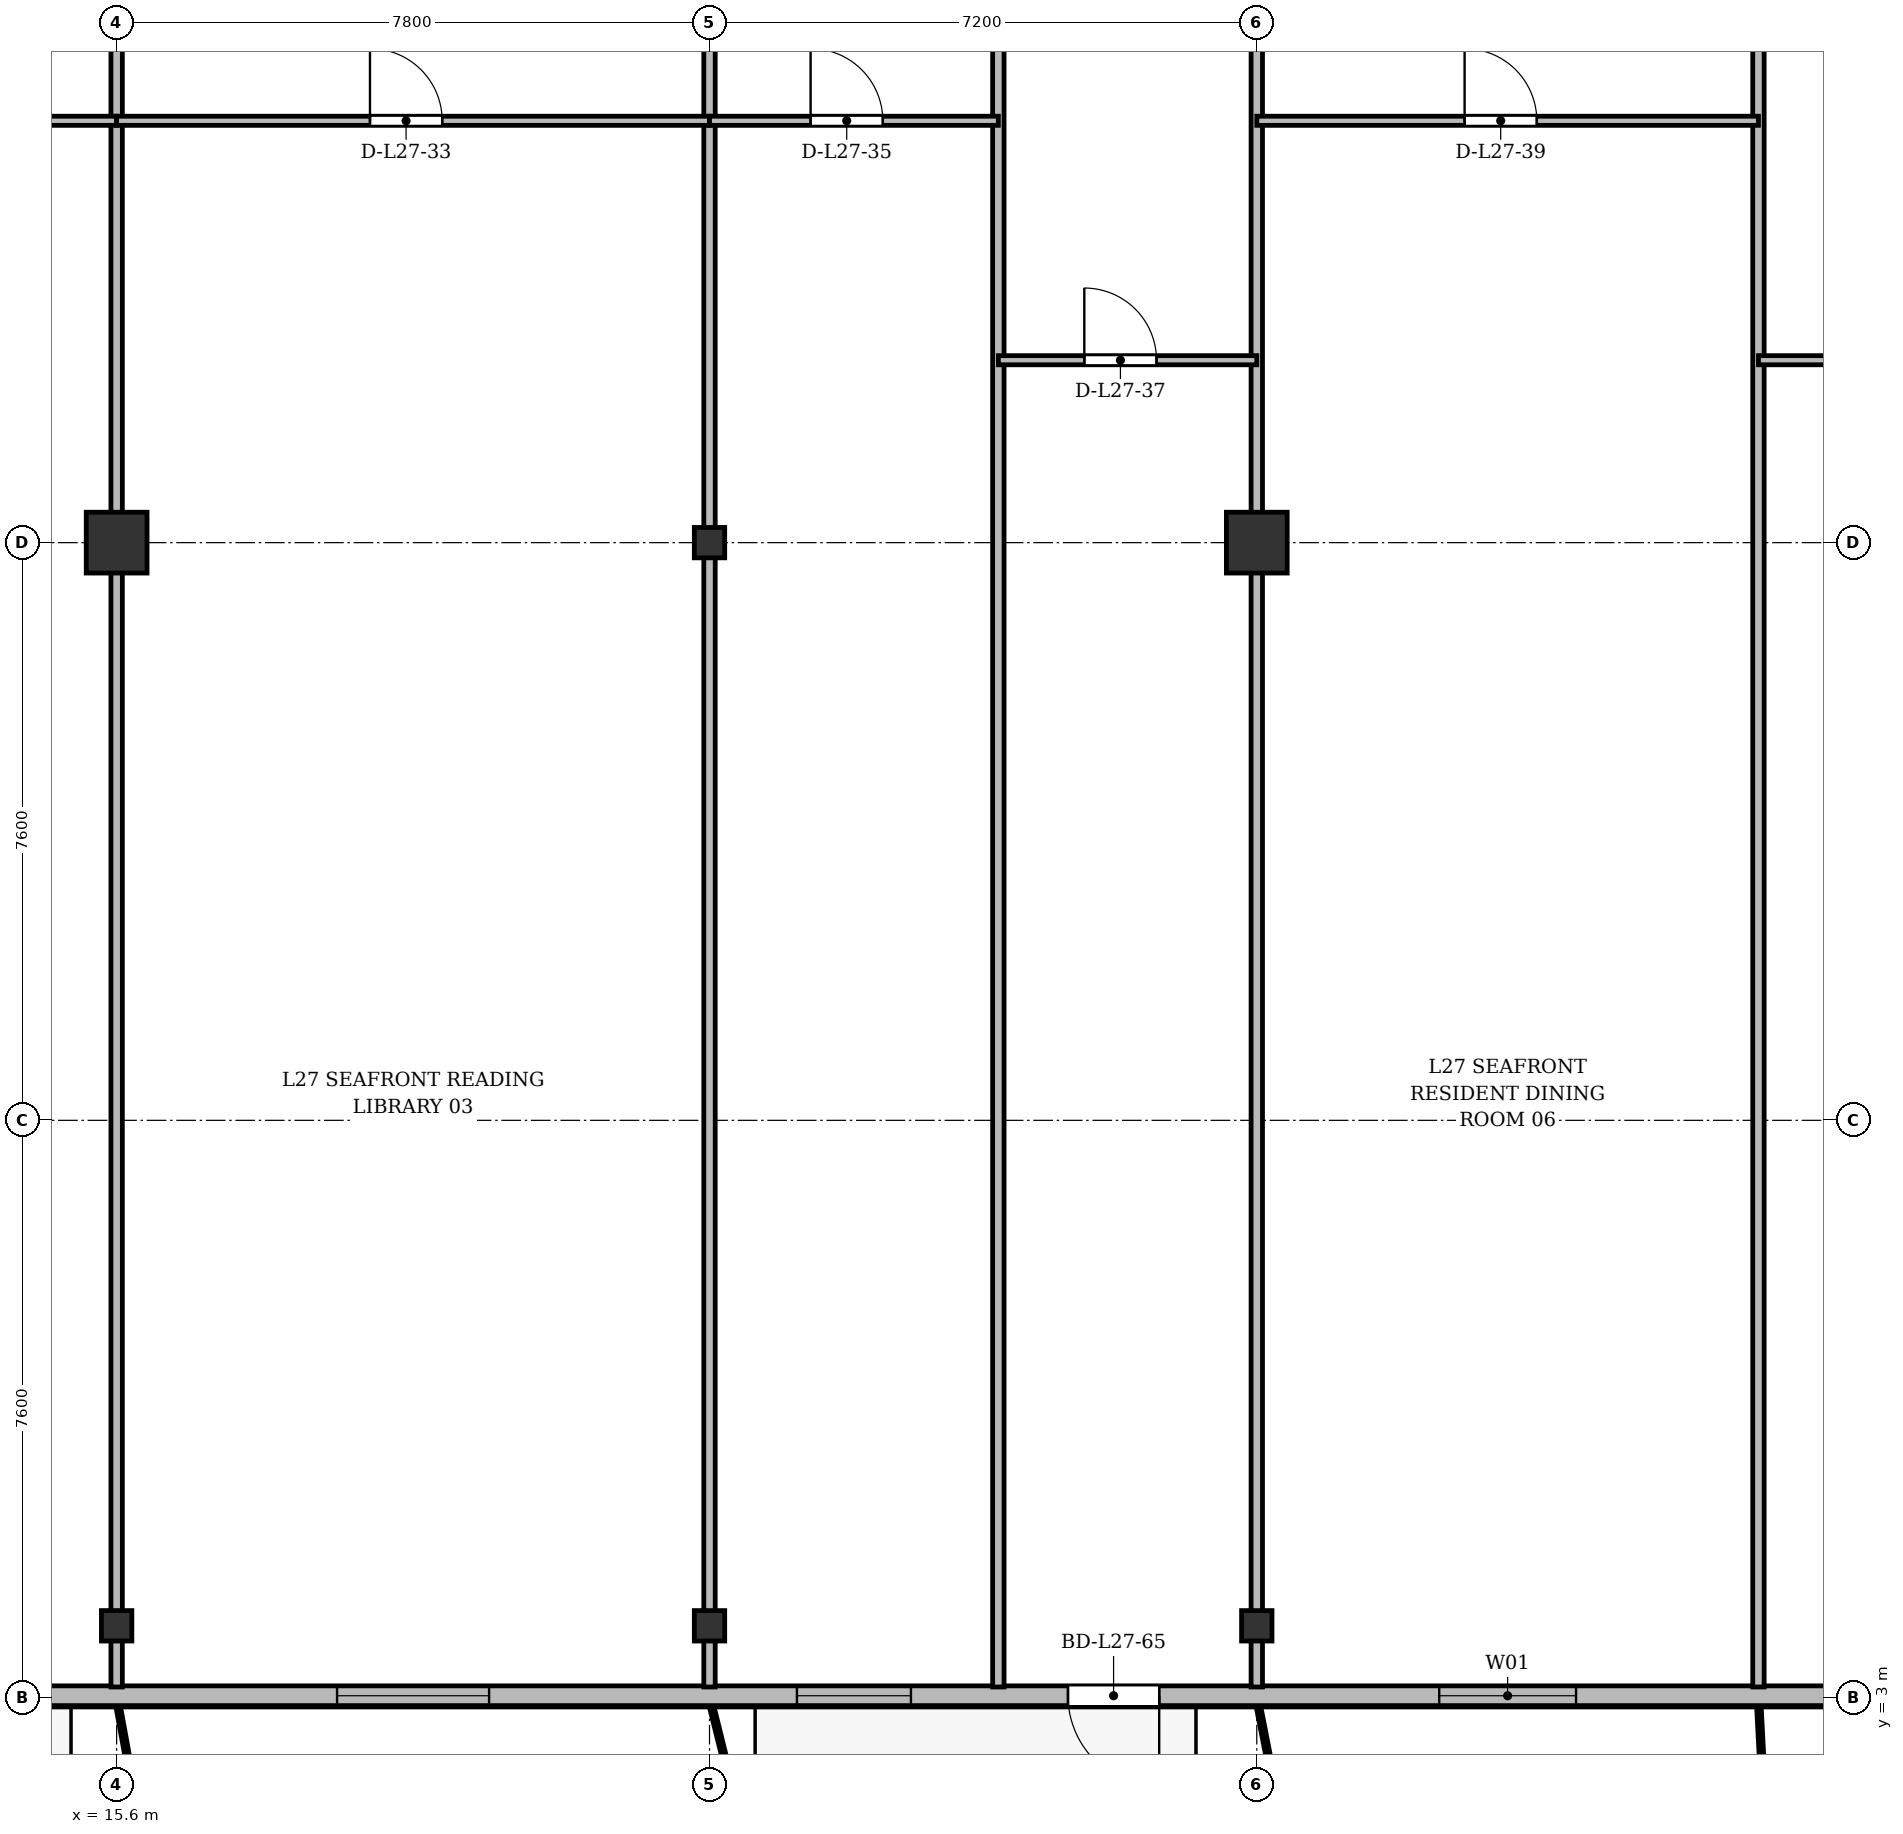
"""IFC4 building model, lengths in metres.
Left out: names, types, materials, properties, quantities, classifications, styles, units other than length and angle.
Written with IfcOpenShell. Run it as: python <this file> out.ifc"""

import sys

from ifc_helpers import new_model, si_unit, direction, frame, frame_2d, origin, origin_2d, place, context, subcontext, project, spatial, rectangle, i_section, extrude, source, transform, mapped, element, fill, save


model = new_model("IFC4")
c1 = context("Model", 3, precision=1e-05, world=origin(), true_north=direction((0.0, 1.0)))
c2 = subcontext(c1, "Body", "Model", "MODEL_VIEW")
j1 = project(units=[si_unit("LENGTHUNIT", "METRE"), si_unit("PLANEANGLEUNIT", "RADIAN")], contexts=[c1])
p1 = place(None, origin())
s1 = spatial("IfcSite", under=j1, at=p1, CompositionType="ELEMENT")
p2 = place(p1, origin())
s2 = spatial("IfcBuilding", under=s1, at=p2, CompositionType="ELEMENT")
p3 = place(p2, frame((0.0, 0.0, 106.9)))
s3 = spatial("IfcBuildingStorey", under=s2, at=p3, CompositionType="ELEMENT", Elevation=106.9)
m1 = source(origin(), c2, "Body", "SweptSolid", [
    extrude(i_section(OverallWidth=0.4, OverallDepth=0.4, WebThickness=0.022, FlangeThickness=0.035, at=origin_2d()), origin(), (0.0, 0.0, 1.0), 3.6),
])
p4 = place(p3, frame((15.6, 3.95, 0.0), z_axis=(0.0, 0.0, 1.0), x_axis=(1.0, 0.0, 0.0)))
e1 = element("IfcColumn", 1, at=p4, inside=s3, PredefinedType="COLUMN", context=c2, shape_type="MappedRepresentation", body=[
    mapped(m1, transform((0.0, 0.0, 0.0), x_axis=(1.0, 0.0, 0.0), y_axis=(0.0, 1.0, 0.0), z_axis=(0.0, 0.0, 1.0), scale=1.0)),
])
m2 = source(origin(), c2, "Body", "SweptSolid", [
    extrude(rectangle(XDim=0.8, YDim=0.8, at=origin_2d()), origin(), (0.0, 0.0, 1.0), 3.6),
])
p5 = place(p3, frame((15.6, 18.2, 0.0), z_axis=(0.0, 0.0, 1.0), x_axis=(1.0, 0.0, 0.0)))
e2 = element("IfcColumn", 2, at=p5, inside=s3, PredefinedType="COLUMN", context=c2, shape_type="MappedRepresentation", body=[
    mapped(m2, transform((0.0, 0.0, 0.0), x_axis=(1.0, 0.0, 0.0), y_axis=(0.0, 1.0, 0.0), z_axis=(0.0, 0.0, 1.0), scale=1.0)),
])
for number, where, z_axis, x_axis in (
    (3, (23.4, 3.95, 0.0), (0.0, 0.0, 1.0), (1.0, 0.0, 0.0)),
    (4, (23.4, 18.2, 0.0), (0.0, 0.0, 1.0), (1.0, 0.0, 0.0)),
    (5, (30.6, 3.95, 0.0), (0.0, 0.0, 1.0), (1.0, 0.0, 0.0)),
):
    element("IfcColumn", number, at=place(p3, frame(where, z_axis=z_axis, x_axis=x_axis)), inside=s3, PredefinedType="COLUMN", context=c2, shape_type="MappedRepresentation", body=[
        mapped(m1, transform((0.0, 0.0, 0.0), x_axis=(1.0, 0.0, 0.0), y_axis=(0.0, 1.0, 0.0), z_axis=(0.0, 0.0, 1.0), scale=1.0)),
    ])
p6 = place(p3, frame((30.6, 18.2, 0.0), z_axis=(0.0, 0.0, 1.0), x_axis=(1.0, 0.0, 0.0)))
e6 = element("IfcColumn", 6, at=p6, inside=s3, PredefinedType="COLUMN", context=c2, shape_type="MappedRepresentation", body=[
    mapped(m2, transform((0.0, 0.0, 0.0), x_axis=(1.0, 0.0, 0.0), y_axis=(0.0, 1.0, 0.0), z_axis=(0.0, 0.0, 1.0), scale=1.0)),
])
p7 = place(p3, frame((66.9, 3.03, 0.0), z_axis=(0.0, 0.0, 1.0), x_axis=(-1.0, 0.0, 0.0)))
e7 = element("IfcWall", 7, at=p7, inside=s3, PredefinedType="SOLIDWALL", context=c2, shape_type="SweptSolid", body=[
    extrude(rectangle(XDim=59.4, YDim=0.26, at=frame_2d((29.7, 0.0))), origin(), (0.0, 0.0, 1.0), 3.34),
])
p8 = place(p7, frame((2.0, 0.0, 0.9)))
e8 = element("IfcOpeningElement", 8, at=p8, cuts=e7, PredefinedType="OPENING", context=c2, shape_type="SweptSolid", body=[
    extrude(rectangle(XDim=2.0, YDim=1.95, at=frame_2d((1.0, 0.975))), frame((0.0, 0.14, 0.0), z_axis=(0.0, -1.0, 0.0), x_axis=(1.0, 0.0, 0.0)), (0.0, 0.0, 1.0), 0.28),
])
p9 = place(p7, frame((5.575, 0.0, 0.9)))
e9 = element("IfcOpeningElement", 9, at=p9, cuts=e7, PredefinedType="OPENING", context=c2, shape_type="SweptSolid", body=[
    extrude(rectangle(XDim=1.65, YDim=1.85, at=frame_2d((0.825, 0.925))), frame((0.0, 0.14, 0.0), z_axis=(0.0, -1.0, 0.0), x_axis=(1.0, 0.0, 0.0)), (0.0, 0.0, 1.0), 0.28),
])
p10 = place(p7, frame((9.213, 0.0, 0.0)))
e10 = element("IfcOpeningElement", 10, at=p10, cuts=e7, PredefinedType="OPENING", context=c2, shape_type="SweptSolid", body=[
    extrude(rectangle(XDim=1.2, YDim=2.2, at=frame_2d((0.6, 1.1))), frame((0.0, 0.14, 0.0), z_axis=(0.0, -1.0, 0.0), x_axis=(1.0, 0.0, 0.0)), (0.0, 0.0, 1.0), 0.28),
])
p11 = place(p7, frame((12.8, 0.0, 0.9)))
e11 = element("IfcOpeningElement", 11, at=p11, cuts=e7, PredefinedType="OPENING", context=c2, shape_type="SweptSolid", body=[
    extrude(rectangle(XDim=2.2, YDim=1.8, at=frame_2d((1.1, 0.9))), frame((0.0, 0.14, 0.0), z_axis=(0.0, -1.0, 0.0), x_axis=(1.0, 0.0, 0.0)), (0.0, 0.0, 1.0), 0.28),
])
p12 = place(p7, frame((16.95, 0.0, 0.9)))
e12 = element("IfcOpeningElement", 12, at=p12, cuts=e7, PredefinedType="OPENING", context=c2, shape_type="SweptSolid", body=[
    extrude(rectangle(XDim=1.5, YDim=1.75, at=frame_2d((0.75, 0.875))), frame((0.0, 0.14, 0.0), z_axis=(0.0, -1.0, 0.0), x_axis=(1.0, 0.0, 0.0)), (0.0, 0.0, 1.0), 0.28),
])
p13 = place(p7, frame((20.3, 0.0, 0.9)))
e13 = element("IfcOpeningElement", 13, at=p13, cuts=e7, PredefinedType="OPENING", context=c2, shape_type="SweptSolid", body=[
    extrude(rectangle(XDim=2.0, YDim=1.95, at=frame_2d((1.0, 0.975))), frame((0.0, 0.14, 0.0), z_axis=(0.0, -1.0, 0.0), x_axis=(1.0, 0.0, 0.0)), (0.0, 0.0, 1.0), 0.28),
])
p14 = place(p7, frame((25.575, 0.0, 0.9)))
e14 = element("IfcOpeningElement", 14, at=p14, cuts=e7, PredefinedType="OPENING", context=c2, shape_type="SweptSolid", body=[
    extrude(rectangle(XDim=1.65, YDim=1.85, at=frame_2d((0.825, 0.925))), frame((0.0, 0.14, 0.0), z_axis=(0.0, -1.0, 0.0), x_axis=(1.0, 0.0, 0.0)), (0.0, 0.0, 1.0), 0.28),
])
p15 = place(p7, frame((32.1, 0.0, 0.9)))
e15 = element("IfcOpeningElement", 15, at=p15, cuts=e7, PredefinedType="OPENING", context=c2, shape_type="SweptSolid", body=[
    extrude(rectangle(XDim=1.8, YDim=1.8, at=frame_2d((0.9, 0.9))), frame((0.0, 0.14, 0.0), z_axis=(0.0, -1.0, 0.0), x_axis=(1.0, 0.0, 0.0)), (0.0, 0.0, 1.0), 0.28),
])
p16 = place(p7, frame((37.584, 0.0, 0.0)))
e16 = element("IfcOpeningElement", 16, at=p16, cuts=e7, PredefinedType="OPENING", context=c2, shape_type="SweptSolid", body=[
    extrude(rectangle(XDim=1.2, YDim=2.2, at=frame_2d((0.6, 1.1))), frame((0.0, 0.14, 0.0), z_axis=(0.0, -1.0, 0.0), x_axis=(1.0, 0.0, 0.0)), (0.0, 0.0, 1.0), 0.28),
])
p17 = place(p7, frame((40.85, 0.0, 0.9)))
e17 = element("IfcOpeningElement", 17, at=p17, cuts=e7, PredefinedType="OPENING", context=c2, shape_type="SweptSolid", body=[
    extrude(rectangle(XDim=1.5, YDim=1.75, at=frame_2d((0.75, 0.875))), frame((0.0, 0.14, 0.0), z_axis=(0.0, -1.0, 0.0), x_axis=(1.0, 0.0, 0.0)), (0.0, 0.0, 1.0), 0.28),
])
p18 = place(p7, frame((46.4, 0.0, 0.9)))
e18 = element("IfcOpeningElement", 18, at=p18, cuts=e7, PredefinedType="OPENING", context=c2, shape_type="SweptSolid", body=[
    extrude(rectangle(XDim=2.0, YDim=1.95, at=frame_2d((1.0, 0.975))), frame((0.0, 0.14, 0.0), z_axis=(0.0, -1.0, 0.0), x_axis=(1.0, 0.0, 0.0)), (0.0, 0.0, 1.0), 0.28),
])
p19 = place(p7, frame((55.817, 0.0, 0.0)))
e19 = element("IfcOpeningElement", 19, at=p19, cuts=e7, PredefinedType="OPENING", context=c2, shape_type="SweptSolid", body=[
    extrude(rectangle(XDim=1.2, YDim=2.2, at=frame_2d((0.6, 1.1))), frame((0.0, 0.14, 0.0), z_axis=(0.0, -1.0, 0.0), x_axis=(1.0, 0.0, 0.0)), (0.0, 0.0, 1.0), 0.28),
])
for number, where, z_axis, x_axis in (
    (20, (15.6, 3.145, 0.0), (0.0, 0.0, 1.0), (0.0, 1.0, 0.0)),
    (21, (23.4, 3.145, 0.0), (0.0, 0.0, 1.0), (0.0, 1.0, 0.0)),
):
    element("IfcWall", number, at=place(p3, frame(where, z_axis=z_axis, x_axis=x_axis)), inside=s3, PredefinedType="PARTITIONING", context=c2, shape_type="SweptSolid", body=[
        extrude(rectangle(XDim=24.455, YDim=0.15, at=frame_2d((12.228, 0.0))), origin(), (0.0, 0.0, 1.0), 2.84),
    ])
p20 = place(p3, frame((27.2, 3.145, 0.0), z_axis=(0.0, 0.0, 1.0), x_axis=(0.0, 1.0, 0.0)))
e22 = element("IfcWall", 22, at=p20, inside=s3, PredefinedType="PARTITIONING", context=c2, shape_type="SweptSolid", body=[
    extrude(rectangle(XDim=24.455, YDim=0.15, at=frame_2d((12.228, 0.0))), origin(), (0.0, 0.0, 1.0), 2.752),
])
p21 = place(p3, frame((30.6, 3.145, 0.0), z_axis=(0.0, 0.0, 1.0), x_axis=(0.0, 1.0, 0.0)))
e23 = element("IfcWall", 23, at=p21, inside=s3, PredefinedType="PARTITIONING", context=c2, shape_type="SweptSolid", body=[
    extrude(rectangle(XDim=24.455, YDim=0.15, at=frame_2d((12.228, 0.0))), origin(), (0.0, 0.0, 1.0), 2.84),
])
p22 = place(p3, frame((37.2, 3.145, 0.0), z_axis=(0.0, 0.0, 1.0), x_axis=(0.0, 1.0, 0.0)))
e24 = element("IfcWall", 24, at=p22, inside=s3, PredefinedType="PARTITIONING", context=c2, shape_type="SweptSolid", body=[
    extrude(rectangle(XDim=24.455, YDim=0.15, at=frame_2d((12.228, 0.0))), origin(), (0.0, 0.0, 1.0), 2.752),
])
p23 = place(p3, frame((8.8, 23.75, 0.0), z_axis=(0.0, 0.0, 1.0), x_axis=(1.0, 0.0, 0.0)))
e25 = element("IfcWall", 25, at=p23, inside=s3, PredefinedType="PARTITIONING", context=c2, shape_type="SweptSolid", body=[
    extrude(rectangle(XDim=6.8, YDim=0.12, at=frame_2d((3.4, 0.0))), origin(), (0.0, 0.0, 1.0), 2.84),
])
p24 = place(p23, frame((2.925, 0.0, 0.0)))
e26 = element("IfcOpeningElement", 26, at=p24, cuts=e25, PredefinedType="OPENING", context=c2, shape_type="SweptSolid", body=[
    extrude(rectangle(XDim=0.95, YDim=2.15, at=frame_2d((0.475, 1.075))), frame((0.0, 0.07, 0.0), z_axis=(0.0, -1.0, 0.0), x_axis=(1.0, 0.0, 0.0)), (0.0, 0.0, 1.0), 0.14),
])
p25 = place(p3, frame((15.6, 23.75, 0.0), z_axis=(0.0, 0.0, 1.0), x_axis=(1.0, 0.0, 0.0)))
e27 = element("IfcWall", 27, at=p25, inside=s3, PredefinedType="PARTITIONING", context=c2, shape_type="SweptSolid", body=[
    extrude(rectangle(XDim=7.8, YDim=0.12, at=frame_2d((3.9, 0.0))), origin(), (0.0, 0.0, 1.0), 2.84),
])
p26 = place(p25, frame((3.333, 0.0, 0.0)))
e28 = element("IfcOpeningElement", 28, at=p26, cuts=e27, PredefinedType="OPENING", context=c2, shape_type="SweptSolid", body=[
    extrude(rectangle(XDim=0.95, YDim=2.15, at=frame_2d((0.475, 1.075))), frame((0.0, 0.07, 0.0), z_axis=(0.0, -1.0, 0.0), x_axis=(1.0, 0.0, 0.0)), (0.0, 0.0, 1.0), 0.14),
])
p27 = place(p3, frame((23.4, 23.75, 0.0), z_axis=(0.0, 0.0, 1.0), x_axis=(1.0, 0.0, 0.0)))
e29 = element("IfcWall", 29, at=p27, inside=s3, PredefinedType="PARTITIONING", context=c2, shape_type="SweptSolid", body=[
    extrude(rectangle(XDim=3.8, YDim=0.12, at=frame_2d((1.9, 0.0))), origin(), (0.0, 0.0, 1.0), 2.84),
])
p28 = place(p27, frame((1.33, 0.0, 0.0)))
e30 = element("IfcOpeningElement", 30, at=p28, cuts=e29, PredefinedType="OPENING", context=c2, shape_type="SweptSolid", body=[
    extrude(rectangle(XDim=0.95, YDim=2.15, at=frame_2d((0.475, 1.075))), frame((0.0, 0.07, 0.0), z_axis=(0.0, -1.0, 0.0), x_axis=(1.0, 0.0, 0.0)), (0.0, 0.0, 1.0), 0.14),
])
p29 = place(p3, frame((27.2, 20.6, 0.0), z_axis=(0.0, 0.0, 1.0), x_axis=(1.0, 0.0, 0.0)))
e31 = element("IfcWall", 31, at=p29, inside=s3, PredefinedType="PARTITIONING", context=c2, shape_type="SweptSolid", body=[
    extrude(rectangle(XDim=3.4, YDim=0.12, at=frame_2d((1.7, 0.0))), origin(), (0.0, 0.0, 1.0), 2.84),
])
p30 = place(p29, frame((1.131, 0.0, 0.0)))
e32 = element("IfcOpeningElement", 32, at=p30, cuts=e31, PredefinedType="OPENING", context=c2, shape_type="SweptSolid", body=[
    extrude(rectangle(XDim=0.95, YDim=2.15, at=frame_2d((0.475, 1.075))), frame((0.0, 0.07, 0.0), z_axis=(0.0, -1.0, 0.0), x_axis=(1.0, 0.0, 0.0)), (0.0, 0.0, 1.0), 0.14),
])
p31 = place(p3, frame((30.6, 23.75, 0.0), z_axis=(0.0, 0.0, 1.0), x_axis=(1.0, 0.0, 0.0)))
e33 = element("IfcWall", 33, at=p31, inside=s3, PredefinedType="PARTITIONING", context=c2, shape_type="SweptSolid", body=[
    extrude(rectangle(XDim=6.6, YDim=0.12, at=frame_2d((3.3, 0.0))), origin(), (0.0, 0.0, 1.0), 2.84),
])
p32 = place(p31, frame((2.734, 0.0, 0.0)))
e34 = element("IfcOpeningElement", 34, at=p32, cuts=e33, PredefinedType="OPENING", context=c2, shape_type="SweptSolid", body=[
    extrude(rectangle(XDim=0.95, YDim=2.15, at=frame_2d((0.475, 1.075))), frame((0.0, 0.07, 0.0), z_axis=(0.0, -1.0, 0.0), x_axis=(1.0, 0.0, 0.0)), (0.0, 0.0, 1.0), 0.14),
])
p33 = place(p3, frame((37.2, 20.6, 0.0), z_axis=(0.0, 0.0, 1.0), x_axis=(1.0, 0.0, 0.0)))
e35 = element("IfcWall", 35, at=p33, inside=s3, PredefinedType="PARTITIONING", context=c2, shape_type="SweptSolid", body=[
    extrude(rectangle(XDim=6.6, YDim=0.12, at=frame_2d((3.3, 0.0))), origin(), (0.0, 0.0, 1.0), 2.84),
])
p34 = place(p33, frame((2.734, 0.0, 0.0)))
e36 = element("IfcOpeningElement", 36, at=p34, cuts=e35, PredefinedType="OPENING", context=c2, shape_type="SweptSolid", body=[
    extrude(rectangle(XDim=0.95, YDim=2.15, at=frame_2d((0.475, 1.075))), frame((0.0, 0.07, 0.0), z_axis=(0.0, -1.0, 0.0), x_axis=(1.0, 0.0, 0.0)), (0.0, 0.0, 1.0), 0.14),
])
m3 = source(origin(), c2, "Body", "SweptSolid", [
    extrude(rectangle(XDim=1.8, YDim=1.8, at=frame_2d((0.9, 0.9))), frame((0.0, 0.03, 0.0), z_axis=(0.0, -1.0, 0.0), x_axis=(1.0, 0.0, 0.0)), (0.0, 0.0, 1.0), 0.06),
])
p35 = place(p15, origin())
e37 = element("IfcWindow", 37, at=p35, inside=s3, PartitioningType="SINGLE_PANEL", PredefinedType="WINDOW", context=c2, shape_type="MappedRepresentation", body=[
    mapped(m3, transform((0.0, 0.0, 0.0), x_axis=(1.0, 0.0, 0.0), y_axis=(0.0, 1.0, 0.0), z_axis=(0.0, 0.0, 1.0), scale=1.0)),
])
fill(e15, e37)
m4 = source(origin(), c2, "Body", "SweptSolid", [
    extrude(rectangle(XDim=1.2, YDim=2.2, at=frame_2d((0.6, 1.1))), frame((0.0, 0.025, 0.0), z_axis=(0.0, -1.0, 0.0), x_axis=(1.0, 0.0, 0.0)), (0.0, 0.0, 1.0), 0.05),
])
p36 = place(p16, origin())
e38 = element("IfcDoor", 38, at=p36, inside=s3, OperationType="SINGLE_SWING_LEFT", PredefinedType="DOOR", context=c2, shape_type="MappedRepresentation", body=[
    mapped(m4, transform((0.0, 0.0, 0.0), x_axis=(1.0, 0.0, 0.0), y_axis=(0.0, 1.0, 0.0), z_axis=(0.0, 0.0, 1.0), scale=1.0)),
])
fill(e16, e38)
m5 = source(origin(), c2, "Body", "SweptSolid", [
    extrude(rectangle(XDim=1.5, YDim=1.75, at=frame_2d((0.75, 0.875))), frame((0.0, 0.03, 0.0), z_axis=(0.0, -1.0, 0.0), x_axis=(1.0, 0.0, 0.0)), (0.0, 0.0, 1.0), 0.06),
])
p37 = place(p17, origin())
e39 = element("IfcWindow", 39, at=p37, inside=s3, PartitioningType="SINGLE_PANEL", PredefinedType="WINDOW", context=c2, shape_type="MappedRepresentation", body=[
    mapped(m5, transform((0.0, 0.0, 0.0), x_axis=(1.0, 0.0, 0.0), y_axis=(0.0, 1.0, 0.0), z_axis=(0.0, 0.0, 1.0), scale=1.0)),
])
fill(e17, e39)
m6 = source(origin(), c2, "Body", "SweptSolid", [
    extrude(rectangle(XDim=2.0, YDim=1.95, at=frame_2d((1.0, 0.975))), frame((0.0, 0.03, 0.0), z_axis=(0.0, -1.0, 0.0), x_axis=(1.0, 0.0, 0.0)), (0.0, 0.0, 1.0), 0.06),
])
p38 = place(p18, origin())
e40 = element("IfcWindow", 40, at=p38, inside=s3, PartitioningType="SINGLE_PANEL", PredefinedType="WINDOW", context=c2, shape_type="MappedRepresentation", body=[
    mapped(m6, transform((0.0, 0.0, 0.0), x_axis=(1.0, 0.0, 0.0), y_axis=(0.0, 1.0, 0.0), z_axis=(0.0, 0.0, 1.0), scale=1.0)),
])
fill(e18, e40)
m7 = source(origin(), c2, "Body", "SweptSolid", [
    extrude(rectangle(XDim=0.95, YDim=2.15, at=frame_2d((0.475, 1.075))), frame((0.0, 0.025, 0.0), z_axis=(0.0, -1.0, 0.0), x_axis=(1.0, 0.0, 0.0)), (0.0, 0.0, 1.0), 0.05),
])
p39 = place(p26, origin())
e41 = element("IfcDoor", 41, at=p39, inside=s3, OperationType="SINGLE_SWING_LEFT", PredefinedType="DOOR", context=c2, shape_type="MappedRepresentation", body=[
    mapped(m7, transform((0.0, 0.0, 0.0), x_axis=(1.0, 0.0, 0.0), y_axis=(0.0, 1.0, 0.0), z_axis=(0.0, 0.0, 1.0), scale=1.0)),
])
fill(e28, e41)
p40 = place(p28, origin())
e42 = element("IfcDoor", 42, at=p40, inside=s3, OperationType="SINGLE_SWING_LEFT", PredefinedType="DOOR", context=c2, shape_type="MappedRepresentation", body=[
    mapped(m7, transform((0.0, 0.0, 0.0), x_axis=(1.0, 0.0, 0.0), y_axis=(0.0, 1.0, 0.0), z_axis=(0.0, 0.0, 1.0), scale=1.0)),
])
fill(e30, e42)
p41 = place(p30, origin())
e43 = element("IfcDoor", 43, at=p41, inside=s3, OperationType="SINGLE_SWING_LEFT", PredefinedType="DOOR", context=c2, shape_type="MappedRepresentation", body=[
    mapped(m7, transform((0.0, 0.0, 0.0), x_axis=(1.0, 0.0, 0.0), y_axis=(0.0, 1.0, 0.0), z_axis=(0.0, 0.0, 1.0), scale=1.0)),
])
fill(e32, e43)
p42 = place(p32, origin())
e44 = element("IfcDoor", 44, at=p42, inside=s3, OperationType="SINGLE_SWING_LEFT", PredefinedType="DOOR", context=c2, shape_type="MappedRepresentation", body=[
    mapped(m7, transform((0.0, 0.0, 0.0), x_axis=(1.0, 0.0, 0.0), y_axis=(0.0, 1.0, 0.0), z_axis=(0.0, 0.0, 1.0), scale=1.0)),
])
fill(e34, e44)
save(model, sys.argv[1])
